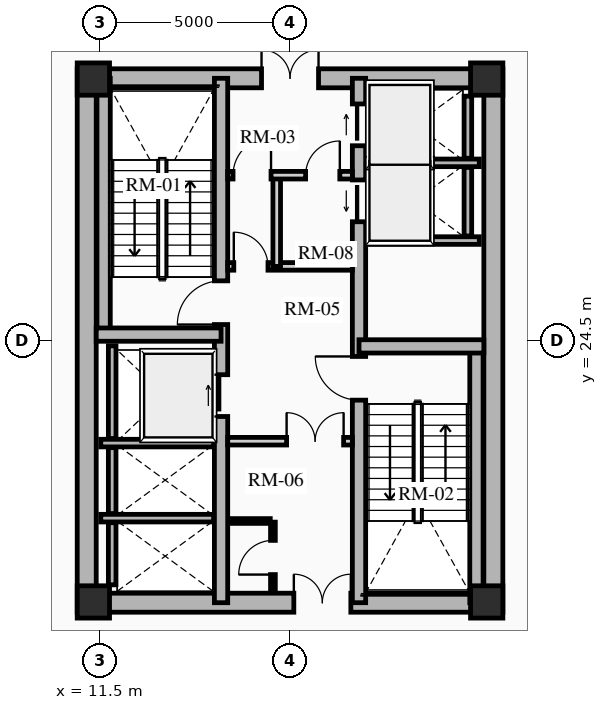
"""IFC4 building model, lengths in metres.
Left out: names, types, materials, properties, quantities, classifications, styles, units other than length and angle.
Written with IfcOpenShell. Run it as: python <this file> out.ifc"""

import sys

from ifc_helpers import new_model, si_unit, direction, frame, frame_2d, origin, origin_2d, place, context, subcontext, project, spatial, rectangle, extrude, source, transform, mapped, element, fill, save


model = new_model("IFC4")
c1 = context("Model", 3, precision=1e-05, world=origin(), true_north=direction((0.0, 1.0)))
c2 = subcontext(c1, "Body", "Model", "MODEL_VIEW")
j1 = project(units=[si_unit("LENGTHUNIT", "METRE"), si_unit("PLANEANGLEUNIT", "RADIAN")], contexts=[c1])
p1 = place(None, origin())
s1 = spatial("IfcSite", under=j1, at=p1, CompositionType="ELEMENT")
p2 = place(p1, origin())
s2 = spatial("IfcBuilding", under=s1, at=p2, CompositionType="ELEMENT")
p3 = place(p2, frame((0.0, 0.0, 13.2)))
s3 = spatial("IfcBuildingStorey", under=s2, at=p3, CompositionType="ELEMENT", Elevation=13.2)
for number, where, z_axis, x_axis in (
    (1, (11.15, 17.35, 0.0), (0.0, 0.0, 1.0), (0.0, 1.0, 0.0)),
    (2, (21.85, 17.35, 0.0), (0.0, 0.0, 1.0), (0.0, 1.0, 0.0)),
):
    element("IfcWall", number, at=place(p3, frame(where, z_axis=z_axis, x_axis=x_axis)), inside=s3, PredefinedType="SHEAR", context=c2, shape_type="SweptSolid", body=[
        extrude(rectangle(XDim=14.3, YDim=0.5, at=frame_2d((7.15, 0.0))), origin(), (0.0, 0.0, 1.0), 4.2),
    ])
p4 = place(p3, frame((11.15, 17.6, 0.0), z_axis=(0.0, 0.0, 1.0), x_axis=(1.0, 0.0, 0.0)))
e3 = element("IfcWall", 3, at=p4, inside=s3, PredefinedType="SHEAR", context=c2, shape_type="SweptSolid", body=[
    extrude(rectangle(XDim=10.7, YDim=0.5, at=frame_2d((5.35, 0.0))), origin(), (0.0, 0.0, 1.0), 4.2),
])
m1 = source(origin(), c2, "Body", "SweptSolid", [
    extrude(rectangle(XDim=1.5, YDim=2.02, at=frame_2d((0.75, 1.01))), frame((0.0, 0.26, 0.0), z_axis=(0.0, -1.0, 0.0), x_axis=(1.0, 0.0, 0.0)), (0.0, 0.0, 1.0), 0.52),
])
p5 = place(p4, frame((5.45, 0.0, 0.0)))
e4 = element("IfcOpeningElement", 4, at=p5, cuts=e3, PredefinedType="OPENING", context=c2, shape_type="MappedRepresentation", body=[
    mapped(m1, transform((0.0, 0.0, 0.0), x_axis=(1.0, 0.0, 0.0), y_axis=(0.0, 1.0, 0.0), z_axis=(0.0, 0.0, 1.0), scale=1.0)),
])
p6 = place(p3, frame((11.15, 31.4, 0.0), z_axis=(0.0, 0.0, 1.0), x_axis=(1.0, 0.0, 0.0)))
e5 = element("IfcWall", 5, at=p6, inside=s3, PredefinedType="SHEAR", context=c2, shape_type="SweptSolid", body=[
    extrude(rectangle(XDim=10.7, YDim=0.5, at=frame_2d((5.35, 0.0))), origin(), (0.0, 0.0, 1.0), 4.2),
])
p7 = place(p6, frame((4.6, 0.0, 0.0)))
e6 = element("IfcOpeningElement", 6, at=p7, cuts=e5, PredefinedType="OPENING", context=c2, shape_type="MappedRepresentation", body=[
    mapped(m1, transform((0.0, 0.0, 0.0), x_axis=(1.0, 0.0, 0.0), y_axis=(0.0, 1.0, 0.0), z_axis=(0.0, 0.0, 1.0), scale=1.0)),
])
p8 = place(p3, frame((14.685, 17.6, 0.0), z_axis=(0.0, 0.0, 1.0), x_axis=(0.0, 1.0, 0.0)))
e7 = element("IfcWall", 7, at=p8, inside=s3, PredefinedType="SHEAR", context=c2, shape_type="SweptSolid", body=[
    extrude(rectangle(XDim=13.8, YDim=0.35, at=frame_2d((6.9, 0.0))), origin(), (0.0, 0.0, 1.0), 4.2),
])
m2 = source(origin(), c2, "Body", "SweptSolid", [
    extrude(rectangle(XDim=1.1, YDim=2.015, at=frame_2d((0.55, 1.007))), frame((0.0, 0.185, 0.0), z_axis=(0.0, -1.0, 0.0), x_axis=(1.0, 0.0, 0.0)), (0.0, 0.0, 1.0), 0.37),
])
p9 = place(p8, frame((4.9, 0.0, 0.0)))
e8 = element("IfcOpeningElement", 8, at=p9, cuts=e7, PredefinedType="OPENING", context=c2, shape_type="MappedRepresentation", body=[
    mapped(m2, transform((0.0, 0.0, 0.0), x_axis=(1.0, 0.0, 0.0), y_axis=(0.0, 1.0, 0.0), z_axis=(0.0, 0.0, 1.0), scale=1.0)),
])
m3 = source(origin(), c2, "Body", "SweptSolid", [
    extrude(rectangle(XDim=1.15, YDim=2.02, at=frame_2d((0.575, 1.01))), frame((0.0, 0.185, 0.0), z_axis=(0.0, -1.0, 0.0), x_axis=(1.0, 0.0, 0.0)), (0.0, 0.0, 1.0), 0.37),
])
p10 = place(p8, frame((7.32, 0.0, 0.0)))
e9 = element("IfcOpeningElement", 9, at=p10, cuts=e7, PredefinedType="OPENING", context=c2, shape_type="MappedRepresentation", body=[
    mapped(m3, transform((0.0, 0.0, 0.0), x_axis=(1.0, 0.0, 0.0), y_axis=(0.0, 1.0, 0.0), z_axis=(0.0, 0.0, 1.0), scale=1.0)),
])
p11 = place(p3, frame((18.315, 17.6, 0.0), z_axis=(0.0, 0.0, 1.0), x_axis=(0.0, 1.0, 0.0)))
e10 = element("IfcWall", 10, at=p11, inside=s3, PredefinedType="SHEAR", context=c2, shape_type="SweptSolid", body=[
    extrude(rectangle(XDim=13.8, YDim=0.35, at=frame_2d((6.9, 0.0))), origin(), (0.0, 0.0, 1.0), 4.2),
])
p12 = place(p11, frame((10.025, 0.0, 0.0)))
e11 = element("IfcOpeningElement", 11, at=p12, cuts=e10, PredefinedType="OPENING", context=c2, shape_type="MappedRepresentation", body=[
    mapped(m2, transform((0.0, 0.0, 0.0), x_axis=(1.0, 0.0, 0.0), y_axis=(0.0, 1.0, 0.0), z_axis=(0.0, 0.0, 1.0), scale=1.0)),
])
p13 = place(p11, frame((12.025, 0.0, 0.0)))
e12 = element("IfcOpeningElement", 12, at=p13, cuts=e10, PredefinedType="OPENING", context=c2, shape_type="MappedRepresentation", body=[
    mapped(m2, transform((0.0, 0.0, 0.0), x_axis=(1.0, 0.0, 0.0), y_axis=(0.0, 1.0, 0.0), z_axis=(0.0, 0.0, 1.0), scale=1.0)),
])
p14 = place(p11, frame((5.33, 0.0, 0.0)))
e13 = element("IfcOpeningElement", 13, at=p14, cuts=e10, PredefinedType="OPENING", context=c2, shape_type="MappedRepresentation", body=[
    mapped(m3, transform((0.0, 0.0, 0.0), x_axis=(1.0, 0.0, 0.0), y_axis=(0.0, 1.0, 0.0), z_axis=(0.0, 0.0, 1.0), scale=1.0)),
])
p15 = place(p3, frame((11.595, 24.655, 0.0), z_axis=(0.0, 0.0, 1.0), x_axis=(0.0, 1.0, 0.0)))
e14 = element("IfcWall", 14, at=p15, inside=s3, PredefinedType="SHEAR", context=c2, shape_type="SweptSolid", body=[
    extrude(rectangle(XDim=6.745, YDim=0.35, at=frame_2d((3.373, 0.0))), origin(), (0.0, 0.0, 1.0), 4.2),
])
p16 = place(p3, frame((11.4, 24.655, 0.0), z_axis=(0.0, 0.0, 1.0), x_axis=(1.0, 0.0, 0.0)))
e15 = element("IfcWall", 15, at=p16, inside=s3, PredefinedType="SHEAR", context=c2, shape_type="SweptSolid", body=[
    extrude(rectangle(XDim=3.285, YDim=0.35, at=frame_2d((1.643, 0.0))), origin(), (0.0, 0.0, 1.0), 4.2),
])
p17 = place(p3, frame((21.405, 17.6, 0.0), z_axis=(0.0, 0.0, 1.0), x_axis=(0.0, 1.0, 0.0)))
e16 = element("IfcWall", 16, at=p17, inside=s3, PredefinedType="SHEAR", context=c2, shape_type="SweptSolid", body=[
    extrude(rectangle(XDim=6.745, YDim=0.35, at=frame_2d((3.373, 0.0))), origin(), (0.0, 0.0, 1.0), 4.2),
])
p18 = place(p3, frame((18.315, 24.345, 0.0), z_axis=(0.0, 0.0, 1.0), x_axis=(1.0, 0.0, 0.0)))
e17 = element("IfcWall", 17, at=p18, inside=s3, PredefinedType="SHEAR", context=c2, shape_type="SweptSolid", body=[
    extrude(rectangle(XDim=3.285, YDim=0.35, at=frame_2d((1.643, 0.0))), origin(), (0.0, 0.0, 1.0), 4.2),
])
for number, where, z_axis, x_axis in (
    (18, (11.325, 17.62, 0.0), (0.0, 0.0, 1.0), (1.0, 0.0, 0.0)),
    (19, (11.325, 31.38, 0.0), (0.0, 0.0, 1.0), (1.0, 0.0, 0.0)),
    (20, (21.675, 17.62, 0.0), (0.0, 0.0, 1.0), (1.0, 0.0, 0.0)),
    (21, (21.675, 31.38, 0.0), (0.0, 0.0, 1.0), (1.0, 0.0, 0.0)),
):
    element("IfcColumn", number, at=place(p3, frame(where, z_axis=z_axis, x_axis=x_axis)), inside=s3, PredefinedType="COLUMN", context=c2, shape_type="SweptSolid", body=[
        extrude(rectangle(XDim=0.85, YDim=0.85, at=origin_2d()), origin(), (0.0, 0.0, 1.0), 4.2),
    ])
p19 = place(p3, frame((11.52, 21.8, 0.0), z_axis=(0.0, 0.0, 1.0), x_axis=(1.0, 0.0, 0.0)))
e22 = element("IfcWall", 22, at=p19, inside=s3, PredefinedType="SHEAR", context=c2, shape_type="SweptSolid", body=[
    extrude(rectangle(XDim=2.97, YDim=0.2, at=frame_2d((1.485, 0.0))), origin(), (0.0, 0.0, 1.0), 4.2),
])
p20 = place(p3, frame((11.82, 21.92, 0.0), z_axis=(0.0, 0.0, 1.0), x_axis=(0.0, 1.0, 0.0)))
e23 = element("IfcWall", 23, at=p20, inside=s3, PredefinedType="SHEAR", context=c2, shape_type="SweptSolid", body=[
    extrude(rectangle(XDim=2.44, YDim=0.2, at=frame_2d((1.22, 0.0))), origin(), (0.0, 0.0, 1.0), 4.2),
])
p21 = place(p3, frame((11.52, 19.825, 0.0), z_axis=(0.0, 0.0, 1.0), x_axis=(1.0, 0.0, 0.0)))
e24 = element("IfcWall", 24, at=p21, inside=s3, PredefinedType="SHEAR", context=c2, shape_type="SweptSolid", body=[
    extrude(rectangle(XDim=2.97, YDim=0.2, at=frame_2d((1.485, 0.0))), origin(), (0.0, 0.0, 1.0), 4.2),
])
p22 = place(p3, frame((11.82, 19.945, 0.0), z_axis=(0.0, 0.0, 1.0), x_axis=(0.0, 1.0, 0.0)))
e25 = element("IfcWall", 25, at=p22, inside=s3, PredefinedType="SHEAR", context=c2, shape_type="SweptSolid", body=[
    extrude(rectangle(XDim=1.735, YDim=0.2, at=frame_2d((0.867, 0.0))), origin(), (0.0, 0.0, 1.0), 4.2),
])
p23 = place(p3, frame((11.82, 18.07, 0.0), z_axis=(0.0, 0.0, 1.0), x_axis=(0.0, 1.0, 0.0)))
e26 = element("IfcWall", 26, at=p23, inside=s3, PredefinedType="SHEAR", context=c2, shape_type="SweptSolid", body=[
    extrude(rectangle(XDim=1.635, YDim=0.2, at=frame_2d((0.817, 0.0))), origin(), (0.0, 0.0, 1.0), 4.2),
])
for number, where, z_axis, x_axis in (
    (27, (18.51, 27.13, 0.0), (0.0, 0.0, 1.0), (1.0, 0.0, 0.0)),
    (28, (18.51, 29.175, 0.0), (0.0, 0.0, 1.0), (1.0, 0.0, 0.0)),
):
    element("IfcWall", number, at=place(p3, frame(where, z_axis=z_axis, x_axis=x_axis)), inside=s3, PredefinedType="SHEAR", context=c2, shape_type="SweptSolid", body=[
        extrude(rectangle(XDim=2.97, YDim=0.2, at=frame_2d((1.485, 0.0))), origin(), (0.0, 0.0, 1.0), 4.2),
    ])
p24 = place(p3, frame((21.18, 27.25, 0.0), z_axis=(0.0, 0.0, 1.0), x_axis=(0.0, 1.0, 0.0)))
e29 = element("IfcWall", 29, at=p24, inside=s3, PredefinedType="SHEAR", context=c2, shape_type="SweptSolid", body=[
    extrude(rectangle(XDim=1.805, YDim=0.2, at=frame_2d((0.902, 0.0))), origin(), (0.0, 0.0, 1.0), 4.2),
])
p25 = place(p3, frame((21.18, 29.295, 0.0), z_axis=(0.0, 0.0, 1.0), x_axis=(0.0, 1.0, 0.0)))
e30 = element("IfcWall", 30, at=p25, inside=s3, PredefinedType="SHEAR", context=c2, shape_type="SweptSolid", body=[
    extrude(rectangle(XDim=1.635, YDim=0.2, at=frame_2d((0.817, 0.0))), origin(), (0.0, 0.0, 1.0), 4.2),
])
p26 = place(p3, frame((14.86, 21.85, 0.0), z_axis=(0.0, 0.0, 1.0), x_axis=(1.0, 0.0, 0.0)))
e31 = element("IfcWall", 31, at=p26, inside=s3, PredefinedType="PARTITIONING", context=c2, shape_type="SweptSolid", body=[
    extrude(rectangle(XDim=3.28, YDim=0.2, at=frame_2d((1.64, 0.0))), origin(), (0.0, 0.0, 1.0), 3.8),
])
m4 = source(origin(), c2, "Body", "SweptSolid", [
    extrude(rectangle(XDim=1.5, YDim=2.02, at=frame_2d((0.75, 1.01))), frame((0.0, 0.11, 0.0), z_axis=(0.0, -1.0, 0.0), x_axis=(1.0, 0.0, 0.0)), (0.0, 0.0, 1.0), 0.22),
])
p27 = place(p26, frame((1.55, 0.0, 0.0)))
e32 = element("IfcOpeningElement", 32, at=p27, cuts=e31, PredefinedType="OPENING", context=c2, shape_type="MappedRepresentation", body=[
    mapped(m4, transform((0.0, 0.0, 0.0), x_axis=(1.0, 0.0, 0.0), y_axis=(0.0, 1.0, 0.0), z_axis=(0.0, 0.0, 1.0), scale=1.0)),
])
p28 = place(p3, frame((14.86, 26.45, 0.0), z_axis=(0.0, 0.0, 1.0), x_axis=(1.0, 0.0, 0.0)))
e33 = element("IfcWall", 33, at=p28, inside=s3, PredefinedType="PARTITIONING", context=c2, shape_type="SweptSolid", body=[
    extrude(rectangle(XDim=3.28, YDim=0.2, at=frame_2d((1.64, 0.0))), origin(), (0.0, 0.0, 1.0), 3.8),
])
m5 = source(origin(), c2, "Body", "SweptSolid", [
    extrude(rectangle(XDim=0.9, YDim=2.005, at=frame_2d((0.45, 1.002))), frame((0.0, 0.11, 0.0), z_axis=(0.0, -1.0, 0.0), x_axis=(1.0, 0.0, 0.0)), (0.0, 0.0, 1.0), 0.22),
])
p29 = place(p28, frame((0.16, 0.0, 0.0)))
e34 = element("IfcOpeningElement", 34, at=p29, cuts=e33, PredefinedType="OPENING", context=c2, shape_type="MappedRepresentation", body=[
    mapped(m5, transform((0.0, 0.0, 0.0), x_axis=(1.0, 0.0, 0.0), y_axis=(0.0, 1.0, 0.0), z_axis=(0.0, 0.0, 1.0), scale=1.0)),
])
p30 = place(p3, frame((16.15, 26.45, 0.0), z_axis=(0.0, 0.0, 1.0), x_axis=(0.0, 1.0, 0.0)))
e35 = element("IfcWall", 35, at=p30, inside=s3, PredefinedType="PARTITIONING", context=c2, shape_type="SweptSolid", body=[
    extrude(rectangle(XDim=2.4, YDim=0.2, at=frame_2d((1.2, 0.0))), origin(), (0.0, 0.0, 1.0), 3.8),
])
p31 = place(p3, frame((14.86, 28.85, 0.0), z_axis=(0.0, 0.0, 1.0), x_axis=(1.0, 0.0, 0.0)))
e36 = element("IfcWall", 36, at=p31, inside=s3, PredefinedType="PARTITIONING", context=c2, shape_type="SweptSolid", body=[
    extrude(rectangle(XDim=3.28, YDim=0.2, at=frame_2d((1.64, 0.0))), origin(), (0.0, 0.0, 1.0), 3.8),
])
m6 = source(origin(), c2, "Body", "SweptSolid", [
    extrude(rectangle(XDim=1.0, YDim=2.015, at=frame_2d((0.5, 1.007))), frame((0.0, 0.11, 0.0), z_axis=(0.0, -1.0, 0.0), x_axis=(1.0, 0.0, 0.0)), (0.0, 0.0, 1.0), 0.22),
])
p32 = place(p31, frame((0.14, 0.0, 0.0)))
e37 = element("IfcOpeningElement", 37, at=p32, cuts=e36, PredefinedType="OPENING", context=c2, shape_type="MappedRepresentation", body=[
    mapped(m6, transform((0.0, 0.0, 0.0), x_axis=(1.0, 0.0, 0.0), y_axis=(0.0, 1.0, 0.0), z_axis=(0.0, 0.0, 1.0), scale=1.0)),
])
p33 = place(p31, frame((2.05, 0.0, 0.0)))
e38 = element("IfcOpeningElement", 38, at=p33, cuts=e36, PredefinedType="OPENING", context=c2, shape_type="MappedRepresentation", body=[
    mapped(m5, transform((0.0, 0.0, 0.0), x_axis=(1.0, 0.0, 0.0), y_axis=(0.0, 1.0, 0.0), z_axis=(0.0, 0.0, 1.0), scale=1.0)),
])
p34 = place(p3, frame((16.05, 17.92, 0.0), z_axis=(0.0, 0.0, 1.0), x_axis=(0.0, 1.0, 0.0)))
e39 = element("IfcWall", 39, at=p34, inside=s3, PredefinedType="PARTITIONING", context=c2, shape_type="SweptSolid", body=[
    extrude(rectangle(XDim=1.8, YDim=0.125, at=frame_2d((0.9, 0.0))), origin(), (0.0, 0.0, 1.0), 3.8),
])
m7 = source(origin(), c2, "Body", "SweptSolid", [
    extrude(rectangle(XDim=0.9, YDim=2.005, at=frame_2d((0.45, 1.002))), frame((0.0, 0.073, 0.0), z_axis=(0.0, -1.0, 0.0), x_axis=(1.0, 0.0, 0.0)), (0.0, 0.0, 1.0), 0.145),
])
p35 = place(p34, frame((0.42, 0.0, 0.0)))
e40 = element("IfcOpeningElement", 40, at=p35, cuts=e39, PredefinedType="OPENING", context=c2, shape_type="MappedRepresentation", body=[
    mapped(m7, transform((0.0, 0.0, 0.0), x_axis=(1.0, 0.0, 0.0), y_axis=(0.0, 1.0, 0.0), z_axis=(0.0, 0.0, 1.0), scale=1.0)),
])
p36 = place(p3, frame((14.88, 19.75, 0.0), z_axis=(0.0, 0.0, 1.0), x_axis=(1.0, 0.0, 0.0)))
e41 = element("IfcWall", 41, at=p36, inside=s3, PredefinedType="PARTITIONING", context=c2, shape_type="SweptSolid", body=[
    extrude(rectangle(XDim=1.1, YDim=0.125, at=frame_2d((0.55, 0.0))), origin(), (0.0, 0.0, 1.0), 3.8),
])
m8 = source(origin(), c2, "Body", "SweptSolid", [
    extrude(rectangle(XDim=1.1, YDim=2.015, at=frame_2d((0.55, 1.007))), frame((0.0, 0.025, 0.0), z_axis=(0.0, -1.0, 0.0), x_axis=(1.0, 0.0, 0.0)), (0.0, 0.0, 1.0), 0.05),
])
p37 = place(p9, origin())
e42 = element("IfcDoor", 42, at=p37, inside=s3, OperationType="SLIDING_TO_RIGHT", PredefinedType="DOOR", context=c2, shape_type="MappedRepresentation", body=[
    mapped(m8, transform((0.0, 0.0, 0.0), x_axis=(1.0, 0.0, 0.0), y_axis=(0.0, 1.0, 0.0), z_axis=(0.0, 0.0, 1.0), scale=1.0)),
])
fill(e8, e42)
p38 = place(p12, origin())
e43 = element("IfcDoor", 43, at=p38, inside=s3, OperationType="SLIDING_TO_LEFT", PredefinedType="DOOR", context=c2, shape_type="MappedRepresentation", body=[
    mapped(m8, transform((0.0, 0.0, 0.0), x_axis=(1.0, 0.0, 0.0), y_axis=(0.0, 1.0, 0.0), z_axis=(0.0, 0.0, 1.0), scale=1.0)),
])
fill(e11, e43)
p39 = place(p13, origin())
e44 = element("IfcDoor", 44, at=p39, inside=s3, OperationType="SLIDING_TO_RIGHT", PredefinedType="DOOR", context=c2, shape_type="MappedRepresentation", body=[
    mapped(m8, transform((0.0, 0.0, 0.0), x_axis=(1.0, 0.0, 0.0), y_axis=(0.0, 1.0, 0.0), z_axis=(0.0, 0.0, 1.0), scale=1.0)),
])
fill(e12, e44)
m9 = source(origin(), c2, "Body", "SweptSolid", [
    extrude(rectangle(XDim=1.15, YDim=2.02, at=frame_2d((0.575, 1.01))), frame((0.0, 0.025, 0.0), z_axis=(0.0, -1.0, 0.0), x_axis=(1.0, 0.0, 0.0)), (0.0, 0.0, 1.0), 0.05),
])
p40 = place(p10, origin())
e45 = element("IfcDoor", 45, at=p40, inside=s3, OperationType="SINGLE_SWING_LEFT", PredefinedType="DOOR", context=c2, shape_type="MappedRepresentation", body=[
    mapped(m9, transform((0.0, 0.0, 0.0), x_axis=(1.0, 0.0, 0.0), y_axis=(0.0, 1.0, 0.0), z_axis=(0.0, 0.0, 1.0), scale=1.0)),
])
fill(e9, e45)
p41 = place(p14, origin())
e46 = element("IfcDoor", 46, at=p41, inside=s3, OperationType="SINGLE_SWING_RIGHT", PredefinedType="DOOR", context=c2, shape_type="MappedRepresentation", body=[
    mapped(m9, transform((0.0, 0.0, 0.0), x_axis=(1.0, 0.0, 0.0), y_axis=(0.0, 1.0, 0.0), z_axis=(0.0, 0.0, 1.0), scale=1.0)),
])
fill(e13, e46)
m10 = source(origin(), c2, "Body", "SweptSolid", [
    extrude(rectangle(XDim=1.5, YDim=2.02, at=frame_2d((0.75, 1.01))), frame((0.0, 0.025, 0.0), z_axis=(0.0, -1.0, 0.0), x_axis=(1.0, 0.0, 0.0)), (0.0, 0.0, 1.0), 0.05),
])
p42 = place(p7, origin())
e47 = element("IfcDoor", 47, at=p42, inside=s3, OperationType="DOUBLE_DOOR_SINGLE_SWING", PredefinedType="DOOR", context=c2, shape_type="MappedRepresentation", body=[
    mapped(m10, transform((0.0, 0.0, 0.0), x_axis=(1.0, 0.0, 0.0), y_axis=(0.0, 1.0, 0.0), z_axis=(0.0, 0.0, 1.0), scale=1.0)),
])
fill(e6, e47)
p43 = place(p5, origin())
e48 = element("IfcDoor", 48, at=p43, inside=s3, OperationType="DOUBLE_DOOR_SINGLE_SWING", PredefinedType="DOOR", context=c2, shape_type="MappedRepresentation", body=[
    mapped(m10, transform((0.0, 0.0, 0.0), x_axis=(1.0, 0.0, 0.0), y_axis=(0.0, 1.0, 0.0), z_axis=(0.0, 0.0, 1.0), scale=1.0)),
])
fill(e4, e48)
p44 = place(p27, origin())
e49 = element("IfcDoor", 49, at=p44, inside=s3, OperationType="DOUBLE_DOOR_SINGLE_SWING", PredefinedType="DOOR", context=c2, shape_type="MappedRepresentation", body=[
    mapped(m10, transform((0.0, 0.0, 0.0), x_axis=(1.0, 0.0, 0.0), y_axis=(0.0, 1.0, 0.0), z_axis=(0.0, 0.0, 1.0), scale=1.0)),
])
fill(e32, e49)
m11 = source(origin(), c2, "Body", "SweptSolid", [
    extrude(rectangle(XDim=0.9, YDim=2.005, at=frame_2d((0.45, 1.002))), frame((0.0, 0.025, 0.0), z_axis=(0.0, -1.0, 0.0), x_axis=(1.0, 0.0, 0.0)), (0.0, 0.0, 1.0), 0.05),
])
p45 = place(p29, origin())
e50 = element("IfcDoor", 50, at=p45, inside=s3, OperationType="SINGLE_SWING_LEFT", PredefinedType="DOOR", context=c2, shape_type="MappedRepresentation", body=[
    mapped(m11, transform((0.0, 0.0, 0.0), x_axis=(1.0, 0.0, 0.0), y_axis=(0.0, 1.0, 0.0), z_axis=(0.0, 0.0, 1.0), scale=1.0)),
])
fill(e34, e50)
m12 = source(origin(), c2, "Body", "SweptSolid", [
    extrude(rectangle(XDim=1.0, YDim=2.015, at=frame_2d((0.5, 1.007))), frame((0.0, 0.025, 0.0), z_axis=(0.0, -1.0, 0.0), x_axis=(1.0, 0.0, 0.0)), (0.0, 0.0, 1.0), 0.05),
])
p46 = place(p32, origin())
e51 = element("IfcDoor", 51, at=p46, inside=s3, OperationType="SINGLE_SWING_RIGHT", PredefinedType="DOOR", context=c2, shape_type="MappedRepresentation", body=[
    mapped(m12, transform((0.0, 0.0, 0.0), x_axis=(1.0, 0.0, 0.0), y_axis=(0.0, 1.0, 0.0), z_axis=(0.0, 0.0, 1.0), scale=1.0)),
])
fill(e37, e51)
p47 = place(p35, origin())
e52 = element("IfcDoor", 52, at=p47, inside=s3, OperationType="SINGLE_SWING_LEFT", PredefinedType="DOOR", context=c2, shape_type="MappedRepresentation", body=[
    mapped(m11, transform((0.0, 0.0, 0.0), x_axis=(1.0, 0.0, 0.0), y_axis=(0.0, 1.0, 0.0), z_axis=(0.0, 0.0, 1.0), scale=1.0)),
])
fill(e40, e52)
p48 = place(p33, origin())
e53 = element("IfcDoor", 53, at=p48, inside=s3, OperationType="SINGLE_SWING_RIGHT", PredefinedType="DOOR", context=c2, shape_type="MappedRepresentation", body=[
    mapped(m11, transform((0.0, 0.0, 0.0), x_axis=(1.0, 0.0, 0.0), y_axis=(0.0, 1.0, 0.0), z_axis=(0.0, 0.0, 1.0), scale=1.0)),
])
fill(e38, e53)
save(model, sys.argv[1])
